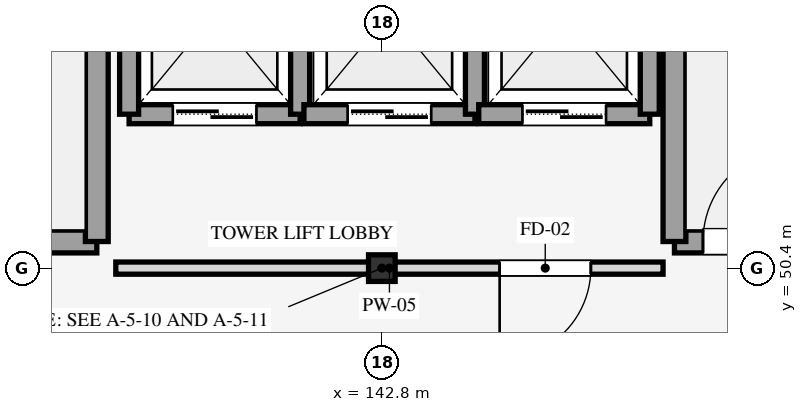
"""IFC4 building model, lengths in metres.
Left out: names, types, materials, properties, quantities, classifications, styles, units other than length and angle.
Written with IfcOpenShell. Run it as: python <this file> out.ifc"""

import sys

from ifc_helpers import new_model, si_unit, direction, frame, frame_2d, origin, origin_2d, place, context, subcontext, project, spatial, rectangle, i_section, extrude, element, fill, save


model = new_model("IFC4")
c1 = context("Model", 3, precision=1e-05, world=origin(), true_north=direction((0.0, 1.0)))
c2 = subcontext(c1, "Body", "Model", "MODEL_VIEW")
j1 = project(units=[si_unit("LENGTHUNIT", "METRE"), si_unit("PLANEANGLEUNIT", "RADIAN")], contexts=[c1])
p1 = place(None, origin())
s1 = spatial("IfcSite", under=j1, at=p1, CompositionType="ELEMENT")
p2 = place(p1, origin())
s2 = spatial("IfcBuilding", under=s1, at=p2, CompositionType="ELEMENT")
p3 = place(p2, frame((0.0, 0.0, 44.7)))
s3 = spatial("IfcBuildingStorey", under=s2, at=p3, CompositionType="ELEMENT", Elevation=44.7)
p4 = place(p3, frame((142.8, 50.4, 0.0), z_axis=(0.0, 0.0, 1.0), x_axis=(1.0, 0.0, 0.0)))
e1 = element("IfcColumn", 1, at=p4, inside=s3, PredefinedType="COLUMN", context=c2, shape_type="SweptSolid", body=[
    extrude(i_section(OverallWidth=0.35, OverallDepth=0.35, WebThickness=0.012, FlangeThickness=0.019, FilletRadius=0.02, at=origin_2d()), origin(), (0.0, 0.0, 1.0), 4.2),
])
p5 = place(p3, frame((135.05, 50.75, 0.0), z_axis=(0.0, 0.0, 1.0), x_axis=(1.0, 0.0, 0.0)))
e2 = element("IfcWall", 2, at=p5, inside=s3, PredefinedType="SHEAR", context=c2, shape_type="SweptSolid", body=[
    extrude(rectangle(XDim=4.0, YDim=0.3, at=frame_2d((2.0, 0.0))), origin(), (0.0, 0.0, 1.0), 4.2),
])
p6 = place(p5, frame((0.375, 0.0, 0.0)))
e3 = element("IfcOpeningElement", 3, at=p6, cuts=e2, PredefinedType="OPENING", context=c2, shape_type="SweptSolid", body=[
    extrude(rectangle(XDim=1.25, YDim=2.15, at=frame_2d((0.625, 1.075))), frame((0.0, 0.16, 0.0), z_axis=(0.0, -1.0, 0.0), x_axis=(1.0, 0.0, 0.0)), (0.0, 0.0, 1.0), 0.32),
])
p7 = place(p3, frame((139.05, 50.75, 0.0), z_axis=(0.0, 0.0, 1.0), x_axis=(0.0, 1.0, 0.0)))
e4 = element("IfcWall", 4, at=p7, inside=s3, PredefinedType="SHEAR", context=c2, shape_type="SweptSolid", body=[
    extrude(rectangle(XDim=14.3, YDim=0.3, at=frame_2d((7.15, 0.0))), origin(), (0.0, 0.0, 1.0), 4.2),
])
p8 = place(p3, frame((146.65, 50.75, 0.0), z_axis=(0.0, 0.0, 1.0), x_axis=(1.0, 0.0, 0.0)))
e5 = element("IfcWall", 5, at=p8, inside=s3, PredefinedType="SHEAR", context=c2, shape_type="SweptSolid", body=[
    extrude(rectangle(XDim=4.0, YDim=0.3, at=frame_2d((2.0, 0.0))), origin(), (0.0, 0.0, 1.0), 4.2),
])
p9 = place(p8, frame((0.375, 0.0, 0.0)))
e6 = element("IfcOpeningElement", 6, at=p9, cuts=e5, PredefinedType="OPENING", context=c2, shape_type="SweptSolid", body=[
    extrude(rectangle(XDim=1.25, YDim=2.15, at=frame_2d((0.625, 1.075))), frame((0.0, 0.16, 0.0), z_axis=(0.0, -1.0, 0.0), x_axis=(1.0, 0.0, 0.0)), (0.0, 0.0, 1.0), 0.32),
])
p10 = place(p3, frame((146.65, 50.75, 0.0), z_axis=(0.0, 0.0, 1.0), x_axis=(0.0, 1.0, 0.0)))
e7 = element("IfcWall", 7, at=p10, inside=s3, PredefinedType="SHEAR", context=c2, shape_type="SweptSolid", body=[
    extrude(rectangle(XDim=14.3, YDim=0.3, at=frame_2d((7.15, 0.0))), origin(), (0.0, 0.0, 1.0), 4.2),
])
p11 = place(p3, frame((139.475, 52.425, 0.0), z_axis=(0.0, 0.0, 1.0), x_axis=(1.0, 0.0, 0.0)))
e8 = element("IfcWall", 8, at=p11, inside=s3, PredefinedType="SHEAR", context=c2, shape_type="SweptSolid", body=[
    extrude(rectangle(XDim=2.25, YDim=0.25, at=frame_2d((1.125, 0.0))), origin(), (0.0, 0.0, 1.0), 3.96),
])
p12 = place(p11, frame((0.575, 0.0, 0.0)))
e9 = element("IfcOpeningElement", 9, at=p12, cuts=e8, PredefinedType="OPENING", context=c2, shape_type="SweptSolid", body=[
    extrude(rectangle(XDim=1.1, YDim=2.15, at=frame_2d((0.55, 1.075))), frame((0.0, 0.135, 0.0), z_axis=(0.0, -1.0, 0.0), x_axis=(1.0, 0.0, 0.0)), (0.0, 0.0, 1.0), 0.27),
])
for number, where, z_axis, x_axis in (
    (10, (139.475, 52.425, 0.0), (0.0, 0.0, 1.0), (0.0, 1.0, 0.0)),
    (11, (141.725, 52.425, 0.0), (0.0, 0.0, 1.0), (0.0, 1.0, 0.0)),
):
    element("IfcWall", number, at=place(p3, frame(where, z_axis=z_axis, x_axis=x_axis)), inside=s3, PredefinedType="SHEAR", context=c2, shape_type="SweptSolid", body=[
        extrude(rectangle(XDim=2.65, YDim=0.25, at=frame_2d((1.325, 0.0))), origin(), (0.0, 0.0, 1.0), 3.96),
    ])
p13 = place(p3, frame((141.775, 52.425, 0.0), z_axis=(0.0, 0.0, 1.0), x_axis=(1.0, 0.0, 0.0)))
e12 = element("IfcWall", 12, at=p13, inside=s3, PredefinedType="SHEAR", context=c2, shape_type="SweptSolid", body=[
    extrude(rectangle(XDim=2.25, YDim=0.25, at=frame_2d((1.125, 0.0))), origin(), (0.0, 0.0, 1.0), 3.96),
])
p14 = place(p13, frame((0.575, 0.0, 0.0)))
e13 = element("IfcOpeningElement", 13, at=p14, cuts=e12, PredefinedType="OPENING", context=c2, shape_type="SweptSolid", body=[
    extrude(rectangle(XDim=1.1, YDim=2.15, at=frame_2d((0.55, 1.075))), frame((0.0, 0.135, 0.0), z_axis=(0.0, -1.0, 0.0), x_axis=(1.0, 0.0, 0.0)), (0.0, 0.0, 1.0), 0.27),
])
p15 = place(p3, frame((144.025, 52.425, 0.0), z_axis=(0.0, 0.0, 1.0), x_axis=(0.0, 1.0, 0.0)))
e14 = element("IfcWall", 14, at=p15, inside=s3, PredefinedType="SHEAR", context=c2, shape_type="SweptSolid", body=[
    extrude(rectangle(XDim=2.65, YDim=0.25, at=frame_2d((1.325, 0.0))), origin(), (0.0, 0.0, 1.0), 3.96),
])
p16 = place(p3, frame((144.075, 52.425, 0.0), z_axis=(0.0, 0.0, 1.0), x_axis=(1.0, 0.0, 0.0)))
e15 = element("IfcWall", 15, at=p16, inside=s3, PredefinedType="SHEAR", context=c2, shape_type="SweptSolid", body=[
    extrude(rectangle(XDim=2.25, YDim=0.25, at=frame_2d((1.125, 0.0))), origin(), (0.0, 0.0, 1.0), 3.96),
])
p17 = place(p16, frame((0.575, 0.0, 0.0)))
e16 = element("IfcOpeningElement", 16, at=p17, cuts=e15, PredefinedType="OPENING", context=c2, shape_type="SweptSolid", body=[
    extrude(rectangle(XDim=1.1, YDim=2.15, at=frame_2d((0.55, 1.075))), frame((0.0, 0.135, 0.0), z_axis=(0.0, -1.0, 0.0), x_axis=(1.0, 0.0, 0.0)), (0.0, 0.0, 1.0), 0.27),
])
p18 = place(p3, frame((146.325, 52.425, 0.0), z_axis=(0.0, 0.0, 1.0), x_axis=(0.0, 1.0, 0.0)))
e17 = element("IfcWall", 17, at=p18, inside=s3, PredefinedType="SHEAR", context=c2, shape_type="SweptSolid", body=[
    extrude(rectangle(XDim=2.65, YDim=0.25, at=frame_2d((1.325, 0.0))), origin(), (0.0, 0.0, 1.0), 3.96),
])
p19 = place(p3, frame((139.3, 50.4, 0.0), z_axis=(0.0, 0.0, 1.0), x_axis=(1.0, 0.0, 0.0)))
e18 = element("IfcWall", 18, at=p19, inside=s3, PredefinedType="PARTITIONING", context=c2, shape_type="SweptSolid", body=[
    extrude(rectangle(XDim=7.2, YDim=0.16, at=frame_2d((3.6, 0.0))), origin(), (0.0, 0.0, 1.0), 3.24),
])
p20 = place(p19, frame((5.05, 0.0, 0.0)))
e19 = element("IfcOpeningElement", 19, at=p20, cuts=e18, PredefinedType="OPENING", context=c2, shape_type="SweptSolid", body=[
    extrude(rectangle(XDim=1.2, YDim=2.15, at=frame_2d((0.6, 1.075))), frame((0.0, 0.09, 0.0), z_axis=(0.0, -1.0, 0.0), x_axis=(1.0, 0.0, 0.0)), (0.0, 0.0, 1.0), 0.18),
])
p21 = place(p9, origin())
e20 = element("IfcDoor", 20, at=p21, inside=s3, OperationType="SINGLE_SWING_RIGHT", PredefinedType="DOOR", context=c2, shape_type="SweptSolid", body=[
    extrude(rectangle(XDim=1.25, YDim=2.15, at=frame_2d((0.625, 1.075))), frame((0.0, 0.025, 0.0), z_axis=(0.0, -1.0, 0.0), x_axis=(1.0, 0.0, 0.0)), (0.0, 0.0, 1.0), 0.05),
])
fill(e6, e20)
p22 = place(p12, origin())
e21 = element("IfcDoor", 21, at=p22, inside=s3, OperationType="DOUBLE_DOOR_SLIDING", PredefinedType="DOOR", context=c2, shape_type="SweptSolid", body=[
    extrude(rectangle(XDim=1.1, YDim=2.15, at=frame_2d((0.55, 1.075))), frame((0.0, 0.025, 0.0), z_axis=(0.0, -1.0, 0.0), x_axis=(1.0, 0.0, 0.0)), (0.0, 0.0, 1.0), 0.05),
])
fill(e9, e21)
p23 = place(p14, origin())
e22 = element("IfcDoor", 22, at=p23, inside=s3, OperationType="DOUBLE_DOOR_SLIDING", PredefinedType="DOOR", context=c2, shape_type="SweptSolid", body=[
    extrude(rectangle(XDim=1.1, YDim=2.15, at=frame_2d((0.55, 1.075))), frame((0.0, 0.025, 0.0), z_axis=(0.0, -1.0, 0.0), x_axis=(1.0, 0.0, 0.0)), (0.0, 0.0, 1.0), 0.05),
])
fill(e13, e22)
p24 = place(p17, origin())
e23 = element("IfcDoor", 23, at=p24, inside=s3, OperationType="DOUBLE_DOOR_SLIDING", PredefinedType="DOOR", context=c2, shape_type="SweptSolid", body=[
    extrude(rectangle(XDim=1.1, YDim=2.15, at=frame_2d((0.55, 1.075))), frame((0.0, 0.025, 0.0), z_axis=(0.0, -1.0, 0.0), x_axis=(1.0, 0.0, 0.0)), (0.0, 0.0, 1.0), 0.05),
])
fill(e16, e23)
p25 = place(p20, frame((1.2, 0.0, 0.0), z_axis=(0.0, 0.0, 1.0), x_axis=(-1.0, 0.0, 0.0)))
e24 = element("IfcDoor", 24, at=p25, inside=s3, OperationType="SINGLE_SWING_RIGHT", PredefinedType="DOOR", context=c2, shape_type="SweptSolid", body=[
    extrude(rectangle(XDim=1.2, YDim=2.15, at=frame_2d((0.6, 1.075))), frame((0.0, 0.025, 0.0), z_axis=(0.0, -1.0, 0.0), x_axis=(1.0, 0.0, 0.0)), (0.0, 0.0, 1.0), 0.05),
])
fill(e19, e24)
save(model, sys.argv[1])
